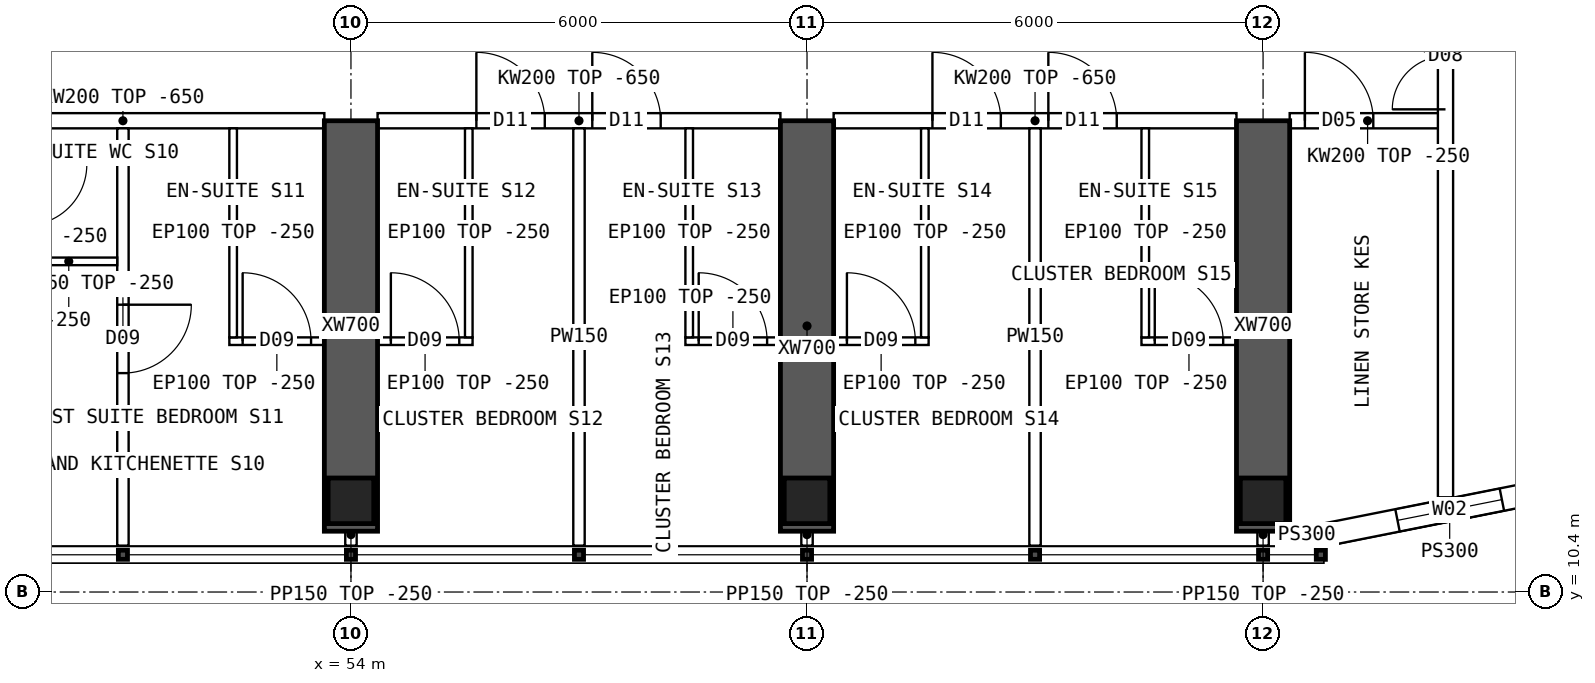
"""IFC4 building model, lengths in metres.
Left out: names, types, materials, properties, quantities, classifications, styles, units other than length and angle.
Written with IfcOpenShell. Run it as: python <this file> out.ifc"""

import sys

from ifc_helpers import new_model, si_unit, direction, frame, frame_2d, origin, origin_2d, place, context, subcontext, project, spatial, polyline, rectangle, hollow_rectangle, outline, extrude, element, fill, save


model = new_model("IFC4")
c1 = context("Model", 3, precision=1e-05, world=origin(), true_north=direction((0.0, 1.0)))
c2 = subcontext(c1, "Body", "Model", "MODEL_VIEW")
j1 = project(units=[si_unit("LENGTHUNIT", "METRE"), si_unit("PLANEANGLEUNIT", "RADIAN")], contexts=[c1])
p1 = place(None, origin())
s1 = spatial("IfcSite", under=j1, at=p1, CompositionType="ELEMENT")
p2 = place(p1, origin())
s2 = spatial("IfcBuilding", under=s1, at=p2, CompositionType="ELEMENT")
p3 = place(p2, frame((0.0, 0.0, 239.05)))
s3 = spatial("IfcBuildingStorey", under=s2, at=p3, CompositionType="ELEMENT", Elevation=239.05)
for number, where, z_axis, x_axis in (
    (1, (54.0, 11.6, 0.0), (0.0, 0.0, 1.0), (1.0, 0.0, 0.0)),
    (2, (60.0, 11.6, 0.0), (0.0, 0.0, 1.0), (1.0, 0.0, 0.0)),
    (3, (66.0, 11.6, 0.0), (0.0, 0.0, 1.0), (1.0, 0.0, 0.0)),
):
    element("IfcColumn", number, at=place(p3, frame(where, z_axis=z_axis, x_axis=x_axis)), inside=s3, PredefinedType="COLUMN", context=c2, shape_type="SweptSolid", body=[
        extrude(hollow_rectangle(XDim=0.6, YDim=0.6, WallThickness=0.06, at=origin_2d()), origin(), (0.0, 0.0, 1.0), 3.75),
    ])
for number, where, z_axis, x_axis in (
    (4, (54.0, 11.2, 0.0), (0.0, 0.0, 1.0), (0.0, 1.0, 0.0)),
    (5, (60.0, 11.2, 0.0), (0.0, 0.0, 1.0), (0.0, 1.0, 0.0)),
    (6, (66.0, 11.2, 0.0), (0.0, 0.0, 1.0), (0.0, 1.0, 0.0)),
):
    element("IfcWall", number, at=place(p3, frame(where, z_axis=z_axis, x_axis=x_axis)), inside=s3, PredefinedType="SHEAR", context=c2, shape_type="SweptSolid", body=[
        extrude(rectangle(XDim=5.4, YDim=0.7, at=frame_2d((2.7, 0.0))), origin(), (0.0, 0.0, 1.0), 3.75),
    ])
p4 = place(p3, frame((66.8, 11.15, 0.0), z_axis=(0.0, 0.0, 1.0), x_axis=(0.98078325777, 0.195100490205, 0.0)))
e7 = element("IfcWall", 7, at=p4, inside=s3, PredefinedType="SOLIDWALL", context=c2, shape_type="SweptSolid", body=[
    extrude(outline(polyline([(-0.03, -0.15), (3.405, -0.15), (3.345, 0.15), (0.03, 0.15), (-0.03, -0.15)])), origin(), (0.0, 0.0, 1.0), 3.5),
])
p5 = place(p4, frame((0.988, 0.0, 0.9)))
e8 = element("IfcOpeningElement", 8, at=p5, cuts=e7, PredefinedType="OPENING", context=c2, shape_type="SweptSolid", body=[
    extrude(rectangle(XDim=1.4, YDim=1.8, at=frame_2d((0.7, 0.9))), frame((0.0, 0.16, 0.0), z_axis=(0.0, -1.0, 0.0), x_axis=(1.0, 0.0, 0.0)), (0.0, 0.0, 1.0), 0.32),
])
p6 = place(p3, frame((66.8, 11.15, 0.0), z_axis=(0.0, 0.0, 1.0), x_axis=(-1.0, 0.0, 0.0)))
e9 = element("IfcWall", 9, at=p6, inside=s3, PredefinedType="SOLIDWALL", context=c2, shape_type="SweptSolid", body=[
    extrude(rectangle(XDim=0.45, YDim=0.3, at=frame_2d((0.225, 0.0))), origin(), (0.0, 0.0, 1.0), 3.5),
])
p7 = place(p3, frame((48.35, 16.6, 0.0), z_axis=(0.0, 0.0, 1.0), x_axis=(1.0, 0.0, 0.0)))
e10 = element("IfcWall", 10, at=p7, inside=s3, PredefinedType="SOLIDWALL", context=c2, shape_type="SweptSolid", body=[
    extrude(outline(polyline([(0.0, 0.0), (5.3, 0.0), (5.3, 3.1), (0.0, 3.1), (0.0, 0.0)])), frame((0.0, 0.1, 0.0), z_axis=(0.0, -1.0, 0.0), x_axis=(1.0, 0.0, 0.0)), (0.0, 0.0, 1.0), 0.2),
])
p8 = place(p7, frame((0.3, 0.0, 0.0)))
e11 = element("IfcOpeningElement", 11, at=p8, cuts=e10, PredefinedType="OPENING", context=c2, shape_type="SweptSolid", body=[
    extrude(rectangle(XDim=0.9, YDim=2.1, at=frame_2d((0.45, 1.05))), frame((0.0, 0.11, 0.0), z_axis=(0.0, -1.0, 0.0), x_axis=(1.0, 0.0, 0.0)), (0.0, 0.0, 1.0), 0.22),
])
p9 = place(p3, frame((54.35, 16.6, 0.0), z_axis=(0.0, 0.0, 1.0), x_axis=(1.0, 0.0, 0.0)))
e12 = element("IfcWall", 12, at=p9, inside=s3, PredefinedType="SOLIDWALL", context=c2, shape_type="SweptSolid", body=[
    extrude(outline(polyline([(0.0, 0.0), (5.3, 0.0), (5.3, 3.1), (0.0, 3.1), (0.0, 0.0)])), frame((0.0, 0.1, 0.0), z_axis=(0.0, -1.0, 0.0), x_axis=(1.0, 0.0, 0.0)), (0.0, 0.0, 1.0), 0.2),
])
p10 = place(p9, frame((1.3, 0.0, 0.0)))
e13 = element("IfcOpeningElement", 13, at=p10, cuts=e12, PredefinedType="OPENING", context=c2, shape_type="SweptSolid", body=[
    extrude(rectangle(XDim=0.9, YDim=2.1, at=frame_2d((0.45, 1.05))), frame((0.0, 0.11, 0.0), z_axis=(0.0, -1.0, 0.0), x_axis=(1.0, 0.0, 0.0)), (0.0, 0.0, 1.0), 0.22),
])
p11 = place(p9, frame((2.825, 0.0, 0.0)))
e14 = element("IfcOpeningElement", 14, at=p11, cuts=e12, PredefinedType="OPENING", context=c2, shape_type="SweptSolid", body=[
    extrude(rectangle(XDim=0.9, YDim=2.1, at=frame_2d((0.45, 1.05))), frame((0.0, 0.11, 0.0), z_axis=(0.0, -1.0, 0.0), x_axis=(1.0, 0.0, 0.0)), (0.0, 0.0, 1.0), 0.22),
])
p12 = place(p3, frame((60.35, 16.6, 0.0), z_axis=(0.0, 0.0, 1.0), x_axis=(1.0, 0.0, 0.0)))
e15 = element("IfcWall", 15, at=p12, inside=s3, PredefinedType="SOLIDWALL", context=c2, shape_type="SweptSolid", body=[
    extrude(outline(polyline([(0.0, 0.0), (5.3, 0.0), (5.3, 3.1), (0.0, 3.1), (0.0, 0.0)])), frame((0.0, 0.1, 0.0), z_axis=(0.0, -1.0, 0.0), x_axis=(1.0, 0.0, 0.0)), (0.0, 0.0, 1.0), 0.2),
])
p13 = place(p12, frame((1.3, 0.0, 0.0)))
e16 = element("IfcOpeningElement", 16, at=p13, cuts=e15, PredefinedType="OPENING", context=c2, shape_type="SweptSolid", body=[
    extrude(rectangle(XDim=0.9, YDim=2.1, at=frame_2d((0.45, 1.05))), frame((0.0, 0.11, 0.0), z_axis=(0.0, -1.0, 0.0), x_axis=(1.0, 0.0, 0.0)), (0.0, 0.0, 1.0), 0.22),
])
p14 = place(p12, frame((2.825, 0.0, 0.0)))
e17 = element("IfcOpeningElement", 17, at=p14, cuts=e15, PredefinedType="OPENING", context=c2, shape_type="SweptSolid", body=[
    extrude(rectangle(XDim=0.9, YDim=2.1, at=frame_2d((0.45, 1.05))), frame((0.0, 0.11, 0.0), z_axis=(0.0, -1.0, 0.0), x_axis=(1.0, 0.0, 0.0)), (0.0, 0.0, 1.0), 0.22),
])
p15 = place(p3, frame((66.35, 16.6, 0.0), z_axis=(0.0, 0.0, 1.0), x_axis=(1.0, 0.0, 0.0)))
e18 = element("IfcWall", 18, at=p15, inside=s3, PredefinedType="SOLIDWALL", context=c2, shape_type="SweptSolid", body=[
    extrude(rectangle(XDim=2.05, YDim=0.2, at=frame_2d((1.025, 0.0))), origin(), (0.0, 0.0, 1.0), 3.5),
])
p16 = place(p15, frame((0.2, 0.0, 0.0)))
e19 = element("IfcOpeningElement", 19, at=p16, cuts=e18, PredefinedType="OPENING", context=c2, shape_type="SweptSolid", body=[
    extrude(rectangle(XDim=0.9, YDim=2.1, at=frame_2d((0.45, 1.05))), frame((0.0, 0.11, 0.0), z_axis=(0.0, -1.0, 0.0), x_axis=(1.0, 0.0, 0.0)), (0.0, 0.0, 1.0), 0.22),
])
p17 = place(p3, frame((51.0, 11.01, 0.0), z_axis=(0.0, 0.0, 1.0), x_axis=(0.0, 1.0, 0.0)))
e20 = element("IfcWall", 20, at=p17, inside=s3, PredefinedType="PARTITIONING", context=c2, shape_type="SweptSolid", body=[
    extrude(outline(polyline([(0.0, 0.0), (5.49, 0.0), (5.49, 3.1), (5.442, 3.1), (5.44, 3.5), (0.792, 3.5), (0.79, 3.1), (0.392, 3.1), (0.39, 3.5), (0.0, 3.5), (0.0, 0.0)])), frame((0.0, 0.075, 0.0), z_axis=(0.0, -1.0, 0.0), x_axis=(1.0, 0.0, 0.0)), (0.0, 0.0, 1.0), 0.15),
])
p18 = place(p17, frame((2.27, 0.0, 0.0)))
e21 = element("IfcOpeningElement", 21, at=p18, cuts=e20, PredefinedType="OPENING", context=c2, shape_type="SweptSolid", body=[
    extrude(rectangle(XDim=0.9, YDim=2.1, at=frame_2d((0.45, 1.05))), frame((0.0, 0.085, 0.0), z_axis=(0.0, -1.0, 0.0), x_axis=(1.0, 0.0, 0.0)), (0.0, 0.0, 1.0), 0.17),
])
p19 = place(p3, frame((53.65, 13.7, 0.0), z_axis=(0.0, 0.0, 1.0), x_axis=(-1.0, 0.0, 0.0)))
e22 = element("IfcWall", 22, at=p19, inside=s3, PredefinedType="PARTITIONING", context=c2, shape_type="SweptSolid", body=[
    extrude(rectangle(XDim=1.25, YDim=0.1, at=frame_2d((0.625, 0.0))), origin(), (0.0, 0.0, 1.0), 3.5),
])
p20 = place(p19, frame((0.175, 0.0, 0.0)))
e23 = element("IfcOpeningElement", 23, at=p20, cuts=e22, PredefinedType="OPENING", context=c2, shape_type="SweptSolid", body=[
    extrude(rectangle(XDim=0.9, YDim=2.1, at=frame_2d((0.45, 1.05))), frame((0.0, 0.06, 0.0), z_axis=(0.0, -1.0, 0.0), x_axis=(1.0, 0.0, 0.0)), (0.0, 0.0, 1.0), 0.12),
])
p21 = place(p3, frame((52.45, 13.75, 0.0), z_axis=(0.0, 0.0, 1.0), x_axis=(0.0, 1.0, 0.0)))
e24 = element("IfcWall", 24, at=p21, inside=s3, PredefinedType="PARTITIONING", context=c2, shape_type="SweptSolid", body=[
    extrude(outline(polyline([(0.0, 0.0), (2.75, 0.0), (2.75, 3.1), (2.702, 3.1), (2.7, 3.5), (0.0, 3.5), (0.0, 0.0)])), frame((0.0, 0.05, 0.0), z_axis=(0.0, -1.0, 0.0), x_axis=(1.0, 0.0, 0.0)), (0.0, 0.0, 1.0), 0.1),
])
p22 = place(p3, frame((49.65, 14.75, 0.0), z_axis=(0.0, 0.0, 1.0), x_axis=(1.0, 0.0, 0.0)))
e25 = element("IfcWall", 25, at=p22, inside=s3, PredefinedType="PARTITIONING", context=c2, shape_type="SweptSolid", body=[
    extrude(rectangle(XDim=1.275, YDim=0.1, at=frame_2d((0.638, 0.0))), origin(), (0.0, 0.0, 1.0), 3.5),
])
p23 = place(p3, frame((57.0, 11.01, 0.0), z_axis=(0.0, 0.0, 1.0), x_axis=(0.0, 1.0, 0.0)))
e26 = element("IfcWall", 26, at=p23, inside=s3, PredefinedType="PARTITIONING", context=c2, shape_type="SweptSolid", body=[
    extrude(outline(polyline([(0.0, 0.0), (5.49, 0.0), (5.49, 3.1), (5.442, 3.1), (5.44, 3.5), (0.792, 3.5), (0.79, 3.1), (0.392, 3.1), (0.39, 3.5), (0.0, 3.5), (0.0, 0.0)])), frame((0.0, 0.075, 0.0), z_axis=(0.0, -1.0, 0.0), x_axis=(1.0, 0.0, 0.0)), (0.0, 0.0, 1.0), 0.15),
])
p24 = place(p3, frame((55.6, 13.7, 0.0), z_axis=(0.0, 0.0, 1.0), x_axis=(-1.0, 0.0, 0.0)))
e27 = element("IfcWall", 27, at=p24, inside=s3, PredefinedType="PARTITIONING", context=c2, shape_type="SweptSolid", body=[
    extrude(rectangle(XDim=1.25, YDim=0.1, at=frame_2d((0.625, 0.0))), origin(), (0.0, 0.0, 1.0), 3.5),
])
p25 = place(p24, frame((0.175, 0.0, 0.0)))
e28 = element("IfcOpeningElement", 28, at=p25, cuts=e27, PredefinedType="OPENING", context=c2, shape_type="SweptSolid", body=[
    extrude(rectangle(XDim=0.9, YDim=2.1, at=frame_2d((0.45, 1.05))), frame((0.0, 0.06, 0.0), z_axis=(0.0, -1.0, 0.0), x_axis=(1.0, 0.0, 0.0)), (0.0, 0.0, 1.0), 0.12),
])
p26 = place(p3, frame((55.55, 13.75, 0.0), z_axis=(0.0, 0.0, 1.0), x_axis=(0.0, 1.0, 0.0)))
e29 = element("IfcWall", 29, at=p26, inside=s3, PredefinedType="PARTITIONING", context=c2, shape_type="SweptSolid", body=[
    extrude(outline(polyline([(0.0, 0.0), (2.75, 0.0), (2.75, 3.1), (2.702, 3.1), (2.7, 3.5), (0.0, 3.5), (0.0, 0.0)])), frame((0.0, 0.05, 0.0), z_axis=(0.0, -1.0, 0.0), x_axis=(1.0, 0.0, 0.0)), (0.0, 0.0, 1.0), 0.1),
])
p27 = place(p3, frame((59.65, 13.7, 0.0), z_axis=(0.0, 0.0, 1.0), x_axis=(-1.0, 0.0, 0.0)))
e30 = element("IfcWall", 30, at=p27, inside=s3, PredefinedType="PARTITIONING", context=c2, shape_type="SweptSolid", body=[
    extrude(rectangle(XDim=1.25, YDim=0.1, at=frame_2d((0.625, 0.0))), origin(), (0.0, 0.0, 1.0), 3.5),
])
p28 = place(p27, frame((0.175, 0.0, 0.0)))
e31 = element("IfcOpeningElement", 31, at=p28, cuts=e30, PredefinedType="OPENING", context=c2, shape_type="SweptSolid", body=[
    extrude(rectangle(XDim=0.9, YDim=2.1, at=frame_2d((0.45, 1.05))), frame((0.0, 0.06, 0.0), z_axis=(0.0, -1.0, 0.0), x_axis=(1.0, 0.0, 0.0)), (0.0, 0.0, 1.0), 0.12),
])
p29 = place(p3, frame((58.45, 13.75, 0.0), z_axis=(0.0, 0.0, 1.0), x_axis=(0.0, 1.0, 0.0)))
e32 = element("IfcWall", 32, at=p29, inside=s3, PredefinedType="PARTITIONING", context=c2, shape_type="SweptSolid", body=[
    extrude(outline(polyline([(0.0, 0.0), (2.75, 0.0), (2.75, 3.1), (2.702, 3.1), (2.7, 3.5), (0.0, 3.5), (0.0, 0.0)])), frame((0.0, 0.05, 0.0), z_axis=(0.0, -1.0, 0.0), x_axis=(1.0, 0.0, 0.0)), (0.0, 0.0, 1.0), 0.1),
])
p30 = place(p3, frame((63.0, 11.01, 0.0), z_axis=(0.0, 0.0, 1.0), x_axis=(0.0, 1.0, 0.0)))
e33 = element("IfcWall", 33, at=p30, inside=s3, PredefinedType="PARTITIONING", context=c2, shape_type="SweptSolid", body=[
    extrude(outline(polyline([(0.0, 0.0), (5.49, 0.0), (5.49, 3.1), (5.442, 3.1), (5.44, 3.5), (0.792, 3.5), (0.79, 3.1), (0.392, 3.1), (0.39, 3.5), (0.0, 3.5), (0.0, 0.0)])), frame((0.0, 0.075, 0.0), z_axis=(0.0, -1.0, 0.0), x_axis=(1.0, 0.0, 0.0)), (0.0, 0.0, 1.0), 0.15),
])
p31 = place(p3, frame((61.6, 13.7, 0.0), z_axis=(0.0, 0.0, 1.0), x_axis=(-1.0, 0.0, 0.0)))
e34 = element("IfcWall", 34, at=p31, inside=s3, PredefinedType="PARTITIONING", context=c2, shape_type="SweptSolid", body=[
    extrude(rectangle(XDim=1.25, YDim=0.1, at=frame_2d((0.625, 0.0))), origin(), (0.0, 0.0, 1.0), 3.5),
])
p32 = place(p31, frame((0.175, 0.0, 0.0)))
e35 = element("IfcOpeningElement", 35, at=p32, cuts=e34, PredefinedType="OPENING", context=c2, shape_type="SweptSolid", body=[
    extrude(rectangle(XDim=0.9, YDim=2.1, at=frame_2d((0.45, 1.05))), frame((0.0, 0.06, 0.0), z_axis=(0.0, -1.0, 0.0), x_axis=(1.0, 0.0, 0.0)), (0.0, 0.0, 1.0), 0.12),
])
p33 = place(p3, frame((61.55, 13.75, 0.0), z_axis=(0.0, 0.0, 1.0), x_axis=(0.0, 1.0, 0.0)))
e36 = element("IfcWall", 36, at=p33, inside=s3, PredefinedType="PARTITIONING", context=c2, shape_type="SweptSolid", body=[
    extrude(outline(polyline([(0.0, 0.0), (2.75, 0.0), (2.75, 3.1), (2.702, 3.1), (2.7, 3.5), (0.0, 3.5), (0.0, 0.0)])), frame((0.0, 0.05, 0.0), z_axis=(0.0, -1.0, 0.0), x_axis=(1.0, 0.0, 0.0)), (0.0, 0.0, 1.0), 0.1),
])
p34 = place(p3, frame((65.65, 13.7, 0.0), z_axis=(0.0, 0.0, 1.0), x_axis=(-1.0, 0.0, 0.0)))
e37 = element("IfcWall", 37, at=p34, inside=s3, PredefinedType="PARTITIONING", context=c2, shape_type="SweptSolid", body=[
    extrude(rectangle(XDim=1.25, YDim=0.1, at=frame_2d((0.625, 0.0))), origin(), (0.0, 0.0, 1.0), 3.5),
])
p35 = place(p34, frame((0.175, 0.0, 0.0)))
e38 = element("IfcOpeningElement", 38, at=p35, cuts=e37, PredefinedType="OPENING", context=c2, shape_type="SweptSolid", body=[
    extrude(rectangle(XDim=0.9, YDim=2.1, at=frame_2d((0.45, 1.05))), frame((0.0, 0.06, 0.0), z_axis=(0.0, -1.0, 0.0), x_axis=(1.0, 0.0, 0.0)), (0.0, 0.0, 1.0), 0.12),
])
p36 = place(p3, frame((64.45, 13.75, 0.0), z_axis=(0.0, 0.0, 1.0), x_axis=(0.0, 1.0, 0.0)))
e39 = element("IfcWall", 39, at=p36, inside=s3, PredefinedType="PARTITIONING", context=c2, shape_type="SweptSolid", body=[
    extrude(outline(polyline([(0.0, 0.0), (2.75, 0.0), (2.75, 3.1), (2.702, 3.1), (2.7, 3.5), (0.0, 3.5), (0.0, 0.0)])), frame((0.0, 0.05, 0.0), z_axis=(0.0, -1.0, 0.0), x_axis=(1.0, 0.0, 0.0)), (0.0, 0.0, 1.0), 0.1),
])
p37 = place(p3, frame((68.4, 11.646, 0.0), z_axis=(0.0, 0.0, 1.0), x_axis=(0.0, 1.0, 0.0)))
e40 = element("IfcWall", 40, at=p37, inside=s3, PredefinedType="SOLIDWALL", context=c2, shape_type="SweptSolid", body=[
    extrude(rectangle(XDim=40.708, YDim=0.2, at=frame_2d((20.354, 0.0))), origin(), (0.0, 0.0, 1.0), 3.5),
])
p38 = place(p37, frame((5.104, 0.0, 0.0)))
e41 = element("IfcOpeningElement", 41, at=p38, cuts=e40, PredefinedType="OPENING", context=c2, shape_type="SweptSolid", body=[
    extrude(rectangle(XDim=1.4, YDim=2.1, at=frame_2d((0.7, 1.05))), frame((0.0, 0.11, 0.0), z_axis=(0.0, -1.0, 0.0), x_axis=(1.0, 0.0, 0.0)), (0.0, 0.0, 1.0), 0.22),
])
p39 = place(p37, frame((34.104, 0.0, 0.0)))
e42 = element("IfcOpeningElement", 42, at=p39, cuts=e40, PredefinedType="OPENING", context=c2, shape_type="SweptSolid", body=[
    extrude(rectangle(XDim=1.4, YDim=2.1, at=frame_2d((0.7, 1.05))), frame((0.0, 0.11, 0.0), z_axis=(0.0, -1.0, 0.0), x_axis=(1.0, 0.0, 0.0)), (0.0, 0.0, 1.0), 0.22),
])
for number, where, z_axis, x_axis in (
    (43, (54.0, 11.3, 0.0), (0.0, 0.0, 1.0), (0.0, -1.0, 0.0)),
    (44, (60.0, 11.3, 0.0), (0.0, 0.0, 1.0), (0.0, -1.0, 0.0)),
    (45, (66.0, 11.3, 0.0), (0.0, 0.0, 1.0), (0.0, -1.0, 0.0)),
):
    element("IfcWall", number, at=place(p3, frame(where, z_axis=z_axis, x_axis=x_axis)), inside=s3, PredefinedType="PARTITIONING", context=c2, shape_type="SweptSolid", body=[
        extrude(rectangle(XDim=0.29, YDim=0.15, at=frame_2d((0.145, 0.0))), origin(), (0.0, 0.0, 1.0), 3.5),
    ])
p40 = place(p5, origin())
e46 = element("IfcWindow", 46, at=p40, inside=s3, PartitioningType="SINGLE_PANEL", PredefinedType="WINDOW", context=c2, shape_type="SweptSolid", body=[
    extrude(rectangle(XDim=1.4, YDim=1.8, at=frame_2d((0.7, 0.9))), frame((0.0, 0.03, 0.0), z_axis=(0.0, -1.0, 0.0), x_axis=(1.0, 0.0, 0.0)), (0.0, 0.0, 1.0), 0.06),
])
fill(e8, e46)
p41 = place(p20, origin())
e47 = element("IfcDoor", 47, at=p41, inside=s3, OperationType="SINGLE_SWING_RIGHT", PredefinedType="DOOR", context=c2, shape_type="SweptSolid", body=[
    extrude(rectangle(XDim=0.9, YDim=2.1, at=frame_2d((0.45, 1.05))), frame((0.0, 0.025, 0.0), z_axis=(0.0, -1.0, 0.0), x_axis=(1.0, 0.0, 0.0)), (0.0, 0.0, 1.0), 0.05),
])
fill(e23, e47)
p42 = place(p18, origin())
e48 = element("IfcDoor", 48, at=p42, inside=s3, OperationType="SINGLE_SWING_RIGHT", PredefinedType="DOOR", context=c2, shape_type="SweptSolid", body=[
    extrude(rectangle(XDim=0.9, YDim=2.1, at=frame_2d((0.45, 1.05))), frame((0.0, 0.025, 0.0), z_axis=(0.0, -1.0, 0.0), x_axis=(1.0, 0.0, 0.0)), (0.0, 0.0, 1.0), 0.05),
])
fill(e21, e48)
p43 = place(p25, origin())
e49 = element("IfcDoor", 49, at=p43, inside=s3, OperationType="SINGLE_SWING_RIGHT", PredefinedType="DOOR", context=c2, shape_type="SweptSolid", body=[
    extrude(rectangle(XDim=0.9, YDim=2.1, at=frame_2d((0.45, 1.05))), frame((0.0, 0.025, 0.0), z_axis=(0.0, -1.0, 0.0), x_axis=(1.0, 0.0, 0.0)), (0.0, 0.0, 1.0), 0.05),
])
fill(e28, e49)
p44 = place(p10, origin())
e50 = element("IfcDoor", 50, at=p44, inside=s3, OperationType="SINGLE_SWING_LEFT", PredefinedType="DOOR", context=c2, shape_type="SweptSolid", body=[
    extrude(rectangle(XDim=0.9, YDim=2.1, at=frame_2d((0.45, 1.05))), frame((0.0, 0.025, 0.0), z_axis=(0.0, -1.0, 0.0), x_axis=(1.0, 0.0, 0.0)), (0.0, 0.0, 1.0), 0.05),
])
fill(e13, e50)
p45 = place(p28, origin())
e51 = element("IfcDoor", 51, at=p45, inside=s3, OperationType="SINGLE_SWING_RIGHT", PredefinedType="DOOR", context=c2, shape_type="SweptSolid", body=[
    extrude(rectangle(XDim=0.9, YDim=2.1, at=frame_2d((0.45, 1.05))), frame((0.0, 0.025, 0.0), z_axis=(0.0, -1.0, 0.0), x_axis=(1.0, 0.0, 0.0)), (0.0, 0.0, 1.0), 0.05),
])
fill(e31, e51)
p46 = place(p11, origin())
e52 = element("IfcDoor", 52, at=p46, inside=s3, OperationType="SINGLE_SWING_LEFT", PredefinedType="DOOR", context=c2, shape_type="SweptSolid", body=[
    extrude(rectangle(XDim=0.9, YDim=2.1, at=frame_2d((0.45, 1.05))), frame((0.0, 0.025, 0.0), z_axis=(0.0, -1.0, 0.0), x_axis=(1.0, 0.0, 0.0)), (0.0, 0.0, 1.0), 0.05),
])
fill(e14, e52)
p47 = place(p32, origin())
e53 = element("IfcDoor", 53, at=p47, inside=s3, OperationType="SINGLE_SWING_RIGHT", PredefinedType="DOOR", context=c2, shape_type="SweptSolid", body=[
    extrude(rectangle(XDim=0.9, YDim=2.1, at=frame_2d((0.45, 1.05))), frame((0.0, 0.025, 0.0), z_axis=(0.0, -1.0, 0.0), x_axis=(1.0, 0.0, 0.0)), (0.0, 0.0, 1.0), 0.05),
])
fill(e35, e53)
p48 = place(p13, origin())
e54 = element("IfcDoor", 54, at=p48, inside=s3, OperationType="SINGLE_SWING_LEFT", PredefinedType="DOOR", context=c2, shape_type="SweptSolid", body=[
    extrude(rectangle(XDim=0.9, YDim=2.1, at=frame_2d((0.45, 1.05))), frame((0.0, 0.025, 0.0), z_axis=(0.0, -1.0, 0.0), x_axis=(1.0, 0.0, 0.0)), (0.0, 0.0, 1.0), 0.05),
])
fill(e16, e54)
p49 = place(p35, origin())
e55 = element("IfcDoor", 55, at=p49, inside=s3, OperationType="SINGLE_SWING_RIGHT", PredefinedType="DOOR", context=c2, shape_type="SweptSolid", body=[
    extrude(rectangle(XDim=0.9, YDim=2.1, at=frame_2d((0.45, 1.05))), frame((0.0, 0.025, 0.0), z_axis=(0.0, -1.0, 0.0), x_axis=(1.0, 0.0, 0.0)), (0.0, 0.0, 1.0), 0.05),
])
fill(e38, e55)
p50 = place(p14, origin())
e56 = element("IfcDoor", 56, at=p50, inside=s3, OperationType="SINGLE_SWING_LEFT", PredefinedType="DOOR", context=c2, shape_type="SweptSolid", body=[
    extrude(rectangle(XDim=0.9, YDim=2.1, at=frame_2d((0.45, 1.05))), frame((0.0, 0.025, 0.0), z_axis=(0.0, -1.0, 0.0), x_axis=(1.0, 0.0, 0.0)), (0.0, 0.0, 1.0), 0.05),
])
fill(e17, e56)
p51 = place(p38, origin())
e57 = element("IfcDoor", 57, at=p51, inside=s3, OperationType="DOUBLE_DOOR_SINGLE_SWING", PredefinedType="DOOR", context=c2, shape_type="SweptSolid", body=[
    extrude(rectangle(XDim=1.4, YDim=2.1, at=frame_2d((0.7, 1.05))), frame((0.0, 0.025, 0.0), z_axis=(0.0, -1.0, 0.0), x_axis=(1.0, 0.0, 0.0)), (0.0, 0.0, 1.0), 0.05),
])
fill(e41, e57)
p52 = place(p16, origin())
e58 = element("IfcDoor", 58, at=p52, inside=s3, OperationType="SINGLE_SWING_LEFT", PredefinedType="DOOR", context=c2, shape_type="SweptSolid", body=[
    extrude(rectangle(XDim=0.9, YDim=2.1, at=frame_2d((0.45, 1.05))), frame((0.0, 0.025, 0.0), z_axis=(0.0, -1.0, 0.0), x_axis=(1.0, 0.0, 0.0)), (0.0, 0.0, 1.0), 0.05),
])
fill(e19, e58)
save(model, sys.argv[1])
